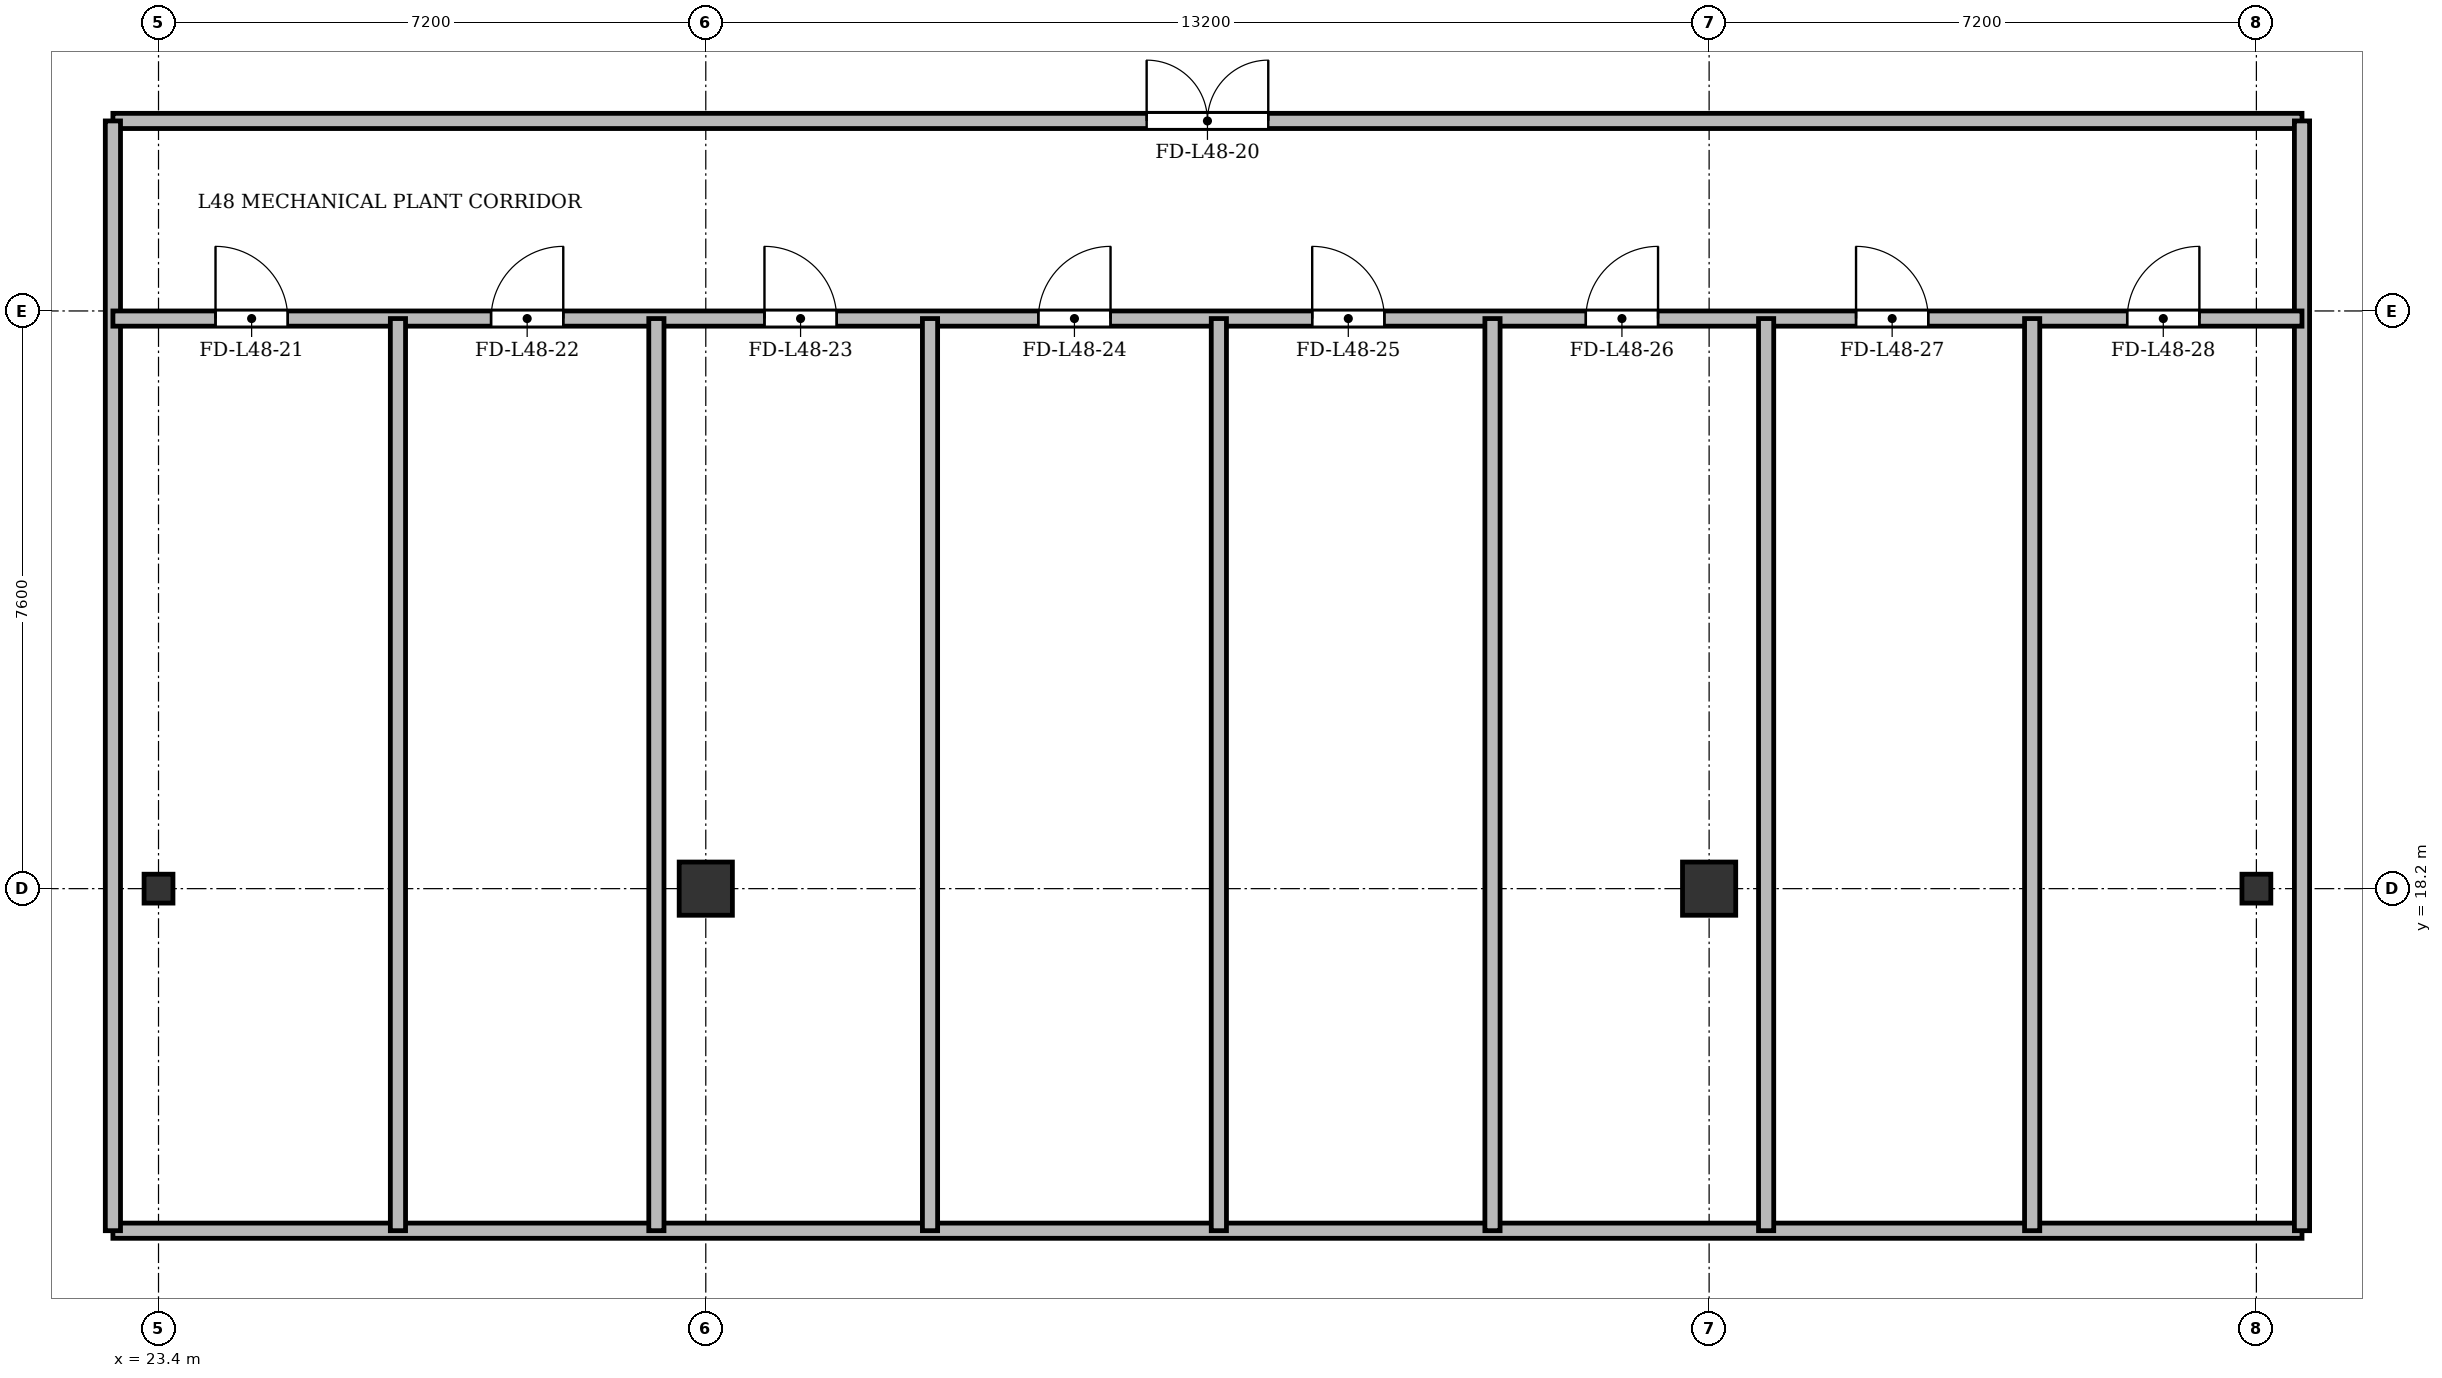
"""IFC4 building model, lengths in metres.
Left out: names, types, materials, properties, quantities, classifications, styles, units other than length and angle.
Written with IfcOpenShell. Run it as: python <this file> out.ifc"""

import sys

from ifc_helpers import new_model, si_unit, direction, frame, frame_2d, origin, origin_2d, place, context, subcontext, project, spatial, rectangle, i_section, extrude, source, transform, mapped, element, fill, save


model = new_model("IFC4")
c1 = context("Model", 3, precision=1e-05, world=origin(), true_north=direction((0.0, 1.0)))
c2 = subcontext(c1, "Body", "Model", "MODEL_VIEW")
j1 = project(units=[si_unit("LENGTHUNIT", "METRE"), si_unit("PLANEANGLEUNIT", "RADIAN")], contexts=[c1])
p1 = place(None, origin())
s1 = spatial("IfcSite", under=j1, at=p1, CompositionType="ELEMENT")
p2 = place(p1, origin())
s2 = spatial("IfcBuilding", under=s1, at=p2, CompositionType="ELEMENT")
p3 = place(p2, frame((0.0, 0.0, 182.5)))
s3 = spatial("IfcBuildingStorey", under=s2, at=p3, CompositionType="ELEMENT", Elevation=182.5)
m1 = source(origin(), c2, "Body", "SweptSolid", [
    extrude(i_section(OverallWidth=0.38, OverallDepth=0.38, WebThickness=0.02, FlangeThickness=0.03, at=origin_2d()), origin(), (0.0, 0.0, 1.0), 8.0),
])
p4 = place(p3, frame((23.4, 18.2, 0.0), z_axis=(0.0, 0.0, 1.0), x_axis=(1.0, 0.0, 0.0)))
e1 = element("IfcColumn", 1, at=p4, inside=s3, PredefinedType="COLUMN", context=c2, shape_type="MappedRepresentation", body=[
    mapped(m1, transform((0.0, 0.0, 0.0), x_axis=(1.0, 0.0, 0.0), y_axis=(0.0, 1.0, 0.0), z_axis=(0.0, 0.0, 1.0), scale=1.0)),
])
m2 = source(origin(), c2, "Body", "SweptSolid", [
    extrude(rectangle(XDim=0.7, YDim=0.7, at=origin_2d()), origin(), (0.0, 0.0, 1.0), 8.0),
])
for number, where, z_axis, x_axis in (
    (2, (30.6, 18.2, 0.0), (0.0, 0.0, 1.0), (1.0, 0.0, 0.0)),
    (3, (43.8, 18.2, 0.0), (0.0, 0.0, 1.0), (1.0, 0.0, 0.0)),
):
    element("IfcColumn", number, at=place(p3, frame(where, z_axis=z_axis, x_axis=x_axis)), inside=s3, PredefinedType="COLUMN", context=c2, shape_type="MappedRepresentation", body=[
        mapped(m2, transform((0.0, 0.0, 0.0), x_axis=(1.0, 0.0, 0.0), y_axis=(0.0, 1.0, 0.0), z_axis=(0.0, 0.0, 1.0), scale=1.0)),
    ])
p5 = place(p3, frame((51.0, 18.2, 0.0), z_axis=(0.0, 0.0, 1.0), x_axis=(1.0, 0.0, 0.0)))
e4 = element("IfcColumn", 4, at=p5, inside=s3, PredefinedType="COLUMN", context=c2, shape_type="MappedRepresentation", body=[
    mapped(m1, transform((0.0, 0.0, 0.0), x_axis=(1.0, 0.0, 0.0), y_axis=(0.0, 1.0, 0.0), z_axis=(0.0, 0.0, 1.0), scale=1.0)),
])
p6 = place(p3, frame((22.8, 28.3, 0.0), z_axis=(0.0, 0.0, 1.0), x_axis=(1.0, 0.0, 0.0)))
e5 = element("IfcWall", 5, at=p6, inside=s3, PredefinedType="PARTITIONING", context=c2, shape_type="SweptSolid", body=[
    extrude(rectangle(XDim=28.8, YDim=0.2, at=frame_2d((14.4, 0.0))), origin(), (0.0, 0.0, 1.0), 7.12),
])
p7 = place(p6, frame((13.6, 0.0, 0.0)))
e6 = element("IfcOpeningElement", 6, at=p7, cuts=e5, PredefinedType="OPENING", context=c2, shape_type="SweptSolid", body=[
    extrude(rectangle(XDim=1.6, YDim=2.2, at=frame_2d((0.8, 1.1))), frame((0.0, 0.11, 0.0), z_axis=(0.0, -1.0, 0.0), x_axis=(1.0, 0.0, 0.0)), (0.0, 0.0, 1.0), 0.22),
])
p8 = place(p3, frame((22.8, 13.7, 0.0), z_axis=(0.0, 0.0, 1.0), x_axis=(1.0, 0.0, 0.0)))
e7 = element("IfcWall", 7, at=p8, inside=s3, PredefinedType="PARTITIONING", context=c2, shape_type="SweptSolid", body=[
    extrude(rectangle(XDim=28.8, YDim=0.2, at=frame_2d((14.4, 0.0))), origin(), (0.0, 0.0, 1.0), 7.12),
])
for number, where, z_axis, x_axis in (
    (8, (22.8, 13.7, 0.0), (0.0, 0.0, 1.0), (0.0, 1.0, 0.0)),
    (9, (51.6, 13.7, 0.0), (0.0, 0.0, 1.0), (0.0, 1.0, 0.0)),
):
    element("IfcWall", number, at=place(p3, frame(where, z_axis=z_axis, x_axis=x_axis)), inside=s3, PredefinedType="PARTITIONING", context=c2, shape_type="SweptSolid", body=[
        extrude(rectangle(XDim=14.6, YDim=0.2, at=frame_2d((7.3, 0.0))), origin(), (0.0, 0.0, 1.0), 7.02),
    ])
p9 = place(p3, frame((22.8, 25.7, 0.0), z_axis=(0.0, 0.0, 1.0), x_axis=(1.0, 0.0, 0.0)))
e10 = element("IfcWall", 10, at=p9, inside=s3, PredefinedType="PARTITIONING", context=c2, shape_type="SweptSolid", body=[
    extrude(rectangle(XDim=28.8, YDim=0.2, at=frame_2d((14.4, 0.0))), origin(), (0.0, 0.0, 1.0), 7.12),
])
p10 = place(p9, frame((1.35, 0.0, 0.0)))
e11 = element("IfcOpeningElement", 11, at=p10, cuts=e10, PredefinedType="OPENING", context=c2, shape_type="SweptSolid", body=[
    extrude(rectangle(XDim=0.95, YDim=2.15, at=frame_2d((0.475, 1.075))), frame((0.0, 0.11, 0.0), z_axis=(0.0, -1.0, 0.0), x_axis=(1.0, 0.0, 0.0)), (0.0, 0.0, 1.0), 0.22),
])
p11 = place(p9, frame((4.975, 0.0, 0.0)))
e12 = element("IfcOpeningElement", 12, at=p11, cuts=e10, PredefinedType="OPENING", context=c2, shape_type="SweptSolid", body=[
    extrude(rectangle(XDim=0.95, YDim=2.15, at=frame_2d((0.475, 1.075))), frame((0.0, 0.11, 0.0), z_axis=(0.0, -1.0, 0.0), x_axis=(1.0, 0.0, 0.0)), (0.0, 0.0, 1.0), 0.22),
])
p12 = place(p9, frame((8.572, 0.0, 0.0)))
e13 = element("IfcOpeningElement", 13, at=p12, cuts=e10, PredefinedType="OPENING", context=c2, shape_type="SweptSolid", body=[
    extrude(rectangle(XDim=0.95, YDim=2.15, at=frame_2d((0.475, 1.075))), frame((0.0, 0.11, 0.0), z_axis=(0.0, -1.0, 0.0), x_axis=(1.0, 0.0, 0.0)), (0.0, 0.0, 1.0), 0.22),
])
p13 = place(p9, frame((12.175, 0.0, 0.0)))
e14 = element("IfcOpeningElement", 14, at=p13, cuts=e10, PredefinedType="OPENING", context=c2, shape_type="SweptSolid", body=[
    extrude(rectangle(XDim=0.95, YDim=2.15, at=frame_2d((0.475, 1.075))), frame((0.0, 0.11, 0.0), z_axis=(0.0, -1.0, 0.0), x_axis=(1.0, 0.0, 0.0)), (0.0, 0.0, 1.0), 0.22),
])
p14 = place(p9, frame((15.778, 0.0, 0.0)))
e15 = element("IfcOpeningElement", 15, at=p14, cuts=e10, PredefinedType="OPENING", context=c2, shape_type="SweptSolid", body=[
    extrude(rectangle(XDim=0.95, YDim=2.15, at=frame_2d((0.475, 1.075))), frame((0.0, 0.11, 0.0), z_axis=(0.0, -1.0, 0.0), x_axis=(1.0, 0.0, 0.0)), (0.0, 0.0, 1.0), 0.22),
])
p15 = place(p9, frame((19.378, 0.0, 0.0)))
e16 = element("IfcOpeningElement", 16, at=p15, cuts=e10, PredefinedType="OPENING", context=c2, shape_type="SweptSolid", body=[
    extrude(rectangle(XDim=0.95, YDim=2.15, at=frame_2d((0.475, 1.075))), frame((0.0, 0.11, 0.0), z_axis=(0.0, -1.0, 0.0), x_axis=(1.0, 0.0, 0.0)), (0.0, 0.0, 1.0), 0.22),
])
p16 = place(p9, frame((22.933, 0.0, 0.0)))
e17 = element("IfcOpeningElement", 17, at=p16, cuts=e10, PredefinedType="OPENING", context=c2, shape_type="SweptSolid", body=[
    extrude(rectangle(XDim=0.95, YDim=2.15, at=frame_2d((0.475, 1.075))), frame((0.0, 0.11, 0.0), z_axis=(0.0, -1.0, 0.0), x_axis=(1.0, 0.0, 0.0)), (0.0, 0.0, 1.0), 0.22),
])
p17 = place(p9, frame((26.5, 0.0, 0.0)))
e18 = element("IfcOpeningElement", 18, at=p17, cuts=e10, PredefinedType="OPENING", context=c2, shape_type="SweptSolid", body=[
    extrude(rectangle(XDim=0.95, YDim=2.15, at=frame_2d((0.475, 1.075))), frame((0.0, 0.11, 0.0), z_axis=(0.0, -1.0, 0.0), x_axis=(1.0, 0.0, 0.0)), (0.0, 0.0, 1.0), 0.22),
])
for number, where, z_axis, x_axis in (
    (19, (26.55, 13.7, 0.0), (0.0, 0.0, 1.0), (0.0, 1.0, 0.0)),
    (20, (29.95, 13.7, 0.0), (0.0, 0.0, 1.0), (0.0, 1.0, 0.0)),
):
    element("IfcWall", number, at=place(p3, frame(where, z_axis=z_axis, x_axis=x_axis)), inside=s3, PredefinedType="PARTITIONING", context=c2, shape_type="SweptSolid", body=[
        extrude(rectangle(XDim=12.0, YDim=0.2, at=frame_2d((6.0, 0.0))), origin(), (0.0, 0.0, 1.0), 7.02),
    ])
for number, where, z_axis, x_axis in (
    (21, (33.55, 13.7, 0.0), (0.0, 0.0, 1.0), (0.0, 1.0, 0.0)),
    (22, (37.35, 13.7, 0.0), (0.0, 0.0, 1.0), (0.0, 1.0, 0.0)),
    (23, (40.95, 13.7, 0.0), (0.0, 0.0, 1.0), (0.0, 1.0, 0.0)),
):
    element("IfcWall", number, at=place(p3, frame(where, z_axis=z_axis, x_axis=x_axis)), inside=s3, PredefinedType="PARTITIONING", context=c2, shape_type="SweptSolid", body=[
        extrude(rectangle(XDim=12.0, YDim=0.2, at=frame_2d((6.0, 0.0))), origin(), (0.0, 0.0, 1.0), 7.62),
    ])
for number, where, z_axis, x_axis in (
    (24, (44.55, 13.7, 0.0), (0.0, 0.0, 1.0), (0.0, 1.0, 0.0)),
    (25, (48.05, 13.7, 0.0), (0.0, 0.0, 1.0), (0.0, 1.0, 0.0)),
):
    element("IfcWall", number, at=place(p3, frame(where, z_axis=z_axis, x_axis=x_axis)), inside=s3, PredefinedType="PARTITIONING", context=c2, shape_type="SweptSolid", body=[
        extrude(rectangle(XDim=12.0, YDim=0.2, at=frame_2d((6.0, 0.0))), origin(), (0.0, 0.0, 1.0), 7.02),
    ])
m3 = source(origin(), c2, "Body", "SweptSolid", [
    extrude(rectangle(XDim=1.6, YDim=2.2, at=frame_2d((0.8, 1.1))), frame((0.0, 0.025, 0.0), z_axis=(0.0, -1.0, 0.0), x_axis=(1.0, 0.0, 0.0)), (0.0, 0.0, 1.0), 0.05),
])
p18 = place(p7, origin())
e26 = element("IfcDoor", 26, at=p18, inside=s3, OperationType="DOUBLE_DOOR_SINGLE_SWING", PredefinedType="DOOR", context=c2, shape_type="MappedRepresentation", body=[
    mapped(m3, transform((0.0, 0.0, 0.0), x_axis=(1.0, 0.0, 0.0), y_axis=(0.0, 1.0, 0.0), z_axis=(0.0, 0.0, 1.0), scale=1.0)),
])
fill(e6, e26)
m4 = source(origin(), c2, "Body", "SweptSolid", [
    extrude(rectangle(XDim=0.95, YDim=2.15, at=frame_2d((0.475, 1.075))), frame((0.0, 0.025, 0.0), z_axis=(0.0, -1.0, 0.0), x_axis=(1.0, 0.0, 0.0)), (0.0, 0.0, 1.0), 0.05),
])
p19 = place(p10, origin())
e27 = element("IfcDoor", 27, at=p19, inside=s3, OperationType="SINGLE_SWING_LEFT", PredefinedType="DOOR", context=c2, shape_type="MappedRepresentation", body=[
    mapped(m4, transform((0.0, 0.0, 0.0), x_axis=(1.0, 0.0, 0.0), y_axis=(0.0, 1.0, 0.0), z_axis=(0.0, 0.0, 1.0), scale=1.0)),
])
fill(e11, e27)
p20 = place(p11, origin())
e28 = element("IfcDoor", 28, at=p20, inside=s3, OperationType="SINGLE_SWING_RIGHT", PredefinedType="DOOR", context=c2, shape_type="MappedRepresentation", body=[
    mapped(m4, transform((0.0, 0.0, 0.0), x_axis=(1.0, 0.0, 0.0), y_axis=(0.0, 1.0, 0.0), z_axis=(0.0, 0.0, 1.0), scale=1.0)),
])
fill(e12, e28)
p21 = place(p12, origin())
e29 = element("IfcDoor", 29, at=p21, inside=s3, OperationType="SINGLE_SWING_LEFT", PredefinedType="DOOR", context=c2, shape_type="MappedRepresentation", body=[
    mapped(m4, transform((0.0, 0.0, 0.0), x_axis=(1.0, 0.0, 0.0), y_axis=(0.0, 1.0, 0.0), z_axis=(0.0, 0.0, 1.0), scale=1.0)),
])
fill(e13, e29)
p22 = place(p13, origin())
e30 = element("IfcDoor", 30, at=p22, inside=s3, OperationType="SINGLE_SWING_RIGHT", PredefinedType="DOOR", context=c2, shape_type="MappedRepresentation", body=[
    mapped(m4, transform((0.0, 0.0, 0.0), x_axis=(1.0, 0.0, 0.0), y_axis=(0.0, 1.0, 0.0), z_axis=(0.0, 0.0, 1.0), scale=1.0)),
])
fill(e14, e30)
p23 = place(p14, origin())
e31 = element("IfcDoor", 31, at=p23, inside=s3, OperationType="SINGLE_SWING_LEFT", PredefinedType="DOOR", context=c2, shape_type="MappedRepresentation", body=[
    mapped(m4, transform((0.0, 0.0, 0.0), x_axis=(1.0, 0.0, 0.0), y_axis=(0.0, 1.0, 0.0), z_axis=(0.0, 0.0, 1.0), scale=1.0)),
])
fill(e15, e31)
p24 = place(p15, origin())
e32 = element("IfcDoor", 32, at=p24, inside=s3, OperationType="SINGLE_SWING_RIGHT", PredefinedType="DOOR", context=c2, shape_type="MappedRepresentation", body=[
    mapped(m4, transform((0.0, 0.0, 0.0), x_axis=(1.0, 0.0, 0.0), y_axis=(0.0, 1.0, 0.0), z_axis=(0.0, 0.0, 1.0), scale=1.0)),
])
fill(e16, e32)
p25 = place(p16, origin())
e33 = element("IfcDoor", 33, at=p25, inside=s3, OperationType="SINGLE_SWING_LEFT", PredefinedType="DOOR", context=c2, shape_type="MappedRepresentation", body=[
    mapped(m4, transform((0.0, 0.0, 0.0), x_axis=(1.0, 0.0, 0.0), y_axis=(0.0, 1.0, 0.0), z_axis=(0.0, 0.0, 1.0), scale=1.0)),
])
fill(e17, e33)
p26 = place(p17, origin())
e34 = element("IfcDoor", 34, at=p26, inside=s3, OperationType="SINGLE_SWING_RIGHT", PredefinedType="DOOR", context=c2, shape_type="MappedRepresentation", body=[
    mapped(m4, transform((0.0, 0.0, 0.0), x_axis=(1.0, 0.0, 0.0), y_axis=(0.0, 1.0, 0.0), z_axis=(0.0, 0.0, 1.0), scale=1.0)),
])
fill(e18, e34)
save(model, sys.argv[1])
